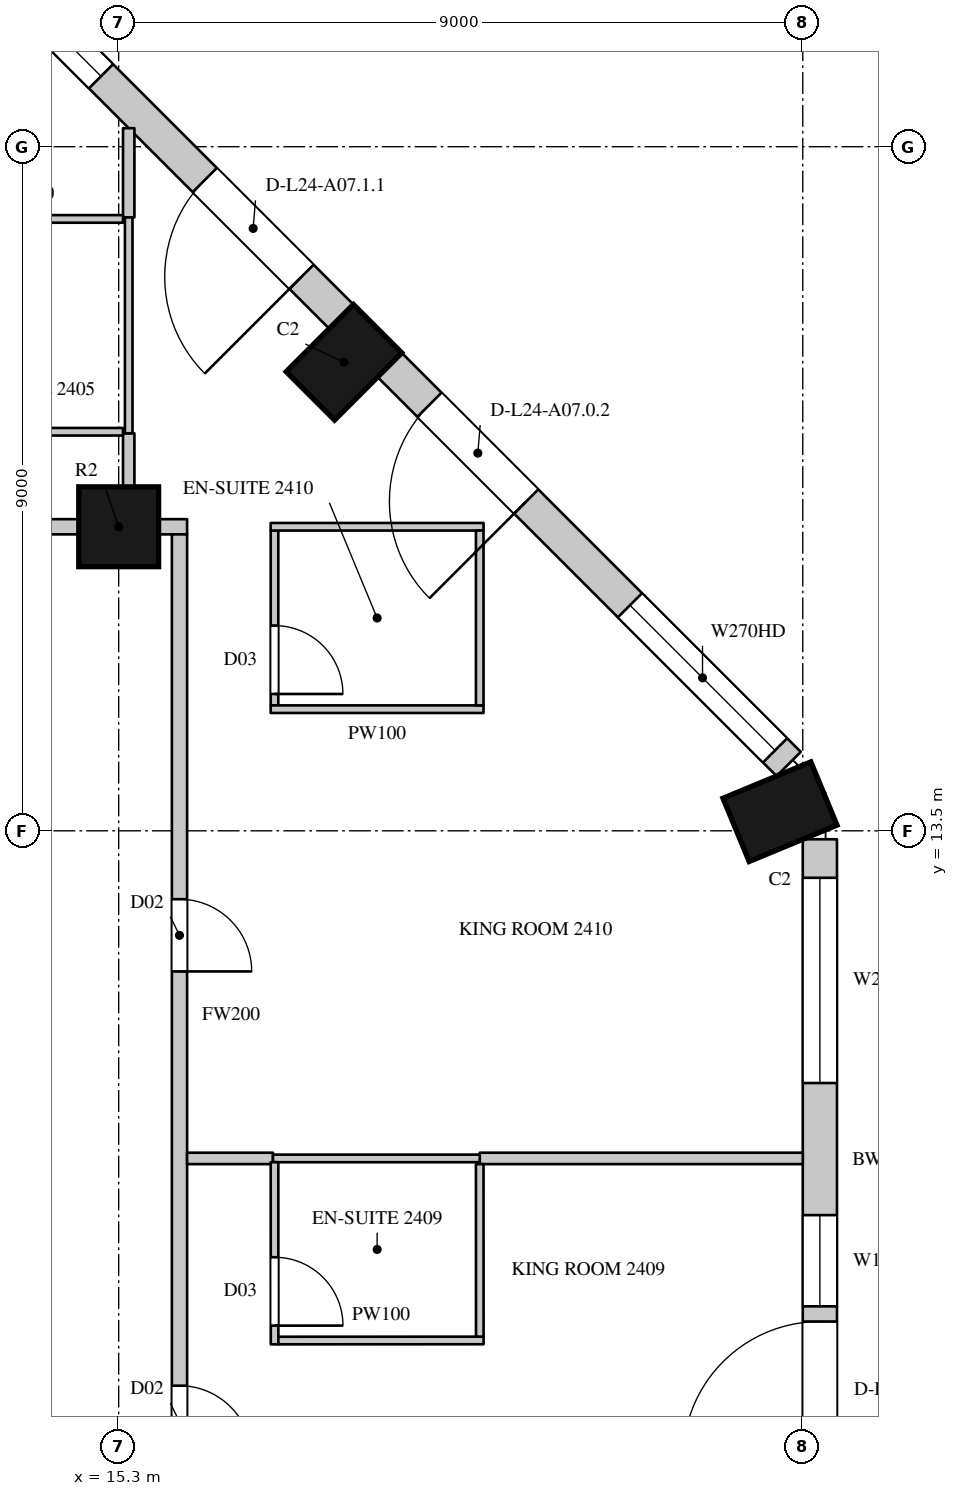
"""IFC4 building model, lengths in metres.
Left out: names, types, materials, properties, quantities, classifications, styles, units other than length and angle.
Written with IfcOpenShell. Run it as: python <this file> out.ifc"""

import sys

from ifc_helpers import new_model, si_unit, direction, frame, frame_2d, origin, origin_2d, place, context, subcontext, project, spatial, rectangle, circle, extrude, element, fill, save


model = new_model("IFC4")
c1 = context("Model", 3, precision=1e-05, world=origin(), true_north=direction((0.0, 1.0)))
c2 = subcontext(c1, "Body", "Model", "MODEL_VIEW")
j1 = project(units=[si_unit("LENGTHUNIT", "METRE"), si_unit("PLANEANGLEUNIT", "RADIAN")], contexts=[c1])
p1 = place(None, origin())
s1 = spatial("IfcSite", under=j1, at=p1, CompositionType="ELEMENT")
p2 = place(p1, origin())
s2 = spatial("IfcBuilding", under=s1, at=p2, CompositionType="ELEMENT")
p3 = place(p2, frame((0.0, 0.0, 116.7)))
s3 = spatial("IfcBuildingStorey", under=s2, at=p3, CompositionType="ELEMENT", Elevation=116.7)
for number, where, z_axis, x_axis in (
    (1, (24.0, 13.752, 0.0), (0.0, 0.0, 1.0), (-0.383, 0.924, 0.0)),
    (2, (18.264, 19.664, 0.0), (0.0, 0.0, 1.0), (-0.707, 0.707, 0.0)),
):
    element("IfcColumn", number, at=place(p3, frame(where, z_axis=z_axis, x_axis=x_axis)), inside=s3, PredefinedType="COLUMN", context=c2, shape_type="SweptSolid", body=[
        extrude(rectangle(XDim=0.9, YDim=1.25, at=origin_2d()), origin(), (0.0, 0.0, 1.0), 3.6),
    ])
p4 = place(p3, frame((15.3, 17.5, 0.0), z_axis=(0.0, 0.0, 1.0), x_axis=(1.0, 0.0, 0.0)))
e3 = element("IfcColumn", 3, at=p4, inside=s3, PredefinedType="COLUMN", context=c2, shape_type="SweptSolid", body=[
    extrude(circle(Radius=0.525, at=origin_2d()), origin(), (0.0, 0.0, 1.0), 3.6),
])
p5 = place(p3, frame((24.525, 4.95, 0.0), z_axis=(0.0, 0.0, 1.0), x_axis=(0.0, 1.0, 0.0)))
e4 = element("IfcWall", 4, at=p5, inside=s3, PredefinedType="SOLIDWALL", context=c2, shape_type="SweptSolid", body=[
    extrude(rectangle(XDim=8.439, YDim=0.45, at=frame_2d((4.219, 0.0))), origin(), (0.0, 0.0, 1.0), 3.3),
])
p6 = place(p5, frame((0.294, 0.0, 0.0)))
e5 = element("IfcOpeningElement", 5, at=p6, cuts=e4, PredefinedType="OPENING", context=c2, shape_type="SweptSolid", body=[
    extrude(rectangle(XDim=1.8, YDim=2.4, at=frame_2d((0.9, 1.2))), frame((0.0, 0.235, 0.0), z_axis=(0.0, -1.0, 0.0), x_axis=(1.0, 0.0, 0.0)), (0.0, 0.0, 1.0), 0.47),
])
p7 = place(p5, frame((2.294, 0.0, 1.05)))
e6 = element("IfcOpeningElement", 6, at=p7, cuts=e4, PredefinedType="OPENING", context=c2, shape_type="SweptSolid", body=[
    extrude(rectangle(XDim=1.2, YDim=2.0, at=frame_2d((0.6, 1.0))), frame((0.0, 0.235, 0.0), z_axis=(0.0, -1.0, 0.0), x_axis=(1.0, 0.0, 0.0)), (0.0, 0.0, 1.0), 0.47),
])
p8 = place(p5, frame((5.232, 0.0, 1.05)))
e7 = element("IfcOpeningElement", 7, at=p8, cuts=e4, PredefinedType="OPENING", context=c2, shape_type="SweptSolid", body=[
    extrude(rectangle(XDim=2.7, YDim=2.0, at=frame_2d((1.35, 1.0))), frame((0.0, 0.235, 0.0), z_axis=(0.0, -1.0, 0.0), x_axis=(1.0, 0.0, 0.0)), (0.0, 0.0, 1.0), 0.47),
])
p9 = place(p3, frame((24.115, 14.379, 0.0), z_axis=(0.0, 0.0, 1.0), x_axis=(-0.707106781187, 0.707106781187, 0.0)))
e8 = element("IfcWall", 8, at=p9, inside=s3, PredefinedType="SOLIDWALL", context=c2, shape_type="SweptSolid", body=[
    extrude(rectangle(XDim=7.424, YDim=0.45, at=frame_2d((3.712, 0.0))), origin(), (0.0, 0.0, 1.0), 3.3),
])
p10 = place(p9, frame((0.253, 0.0, 1.05)))
e9 = element("IfcOpeningElement", 9, at=p10, cuts=e8, PredefinedType="OPENING", context=c2, shape_type="SweptSolid", body=[
    extrude(rectangle(XDim=2.7, YDim=2.0, at=frame_2d((1.35, 1.0))), frame((0.0, 0.235, 0.0), z_axis=(0.0, -1.0, 0.0), x_axis=(1.0, 0.0, 0.0)), (0.0, 0.0, 1.0), 0.47),
])
p11 = place(p9, frame((4.884, 0.0, 0.0)))
e10 = element("IfcOpeningElement", 10, at=p11, cuts=e8, PredefinedType="OPENING", context=c2, shape_type="SweptSolid", body=[
    extrude(rectangle(XDim=1.8, YDim=2.4, at=frame_2d((0.9, 1.2))), frame((0.0, 0.235, 0.0), z_axis=(0.0, -1.0, 0.0), x_axis=(1.0, 0.0, 0.0)), (0.0, 0.0, 1.0), 0.47),
])
p12 = place(p3, frame((18.229, 20.265, 0.0), z_axis=(0.0, 0.0, 1.0), x_axis=(-0.707106781187, 0.707106781187, 0.0)))
e11 = element("IfcWall", 11, at=p12, inside=s3, PredefinedType="SOLIDWALL", context=c2, shape_type="SweptSolid", body=[
    extrude(rectangle(XDim=7.424, YDim=0.45, at=frame_2d((3.712, 0.0))), origin(), (0.0, 0.0, 1.0), 3.3),
])
p13 = place(p12, frame((0.74, 0.0, 0.0)))
e12 = element("IfcOpeningElement", 12, at=p13, cuts=e11, PredefinedType="OPENING", context=c2, shape_type="SweptSolid", body=[
    extrude(rectangle(XDim=1.8, YDim=2.4, at=frame_2d((0.9, 1.2))), frame((0.0, 0.235, 0.0), z_axis=(0.0, -1.0, 0.0), x_axis=(1.0, 0.0, 0.0)), (0.0, 0.0, 1.0), 0.47),
])
p14 = place(p12, frame((4.471, 0.0, 1.05)))
e13 = element("IfcOpeningElement", 13, at=p14, cuts=e11, PredefinedType="OPENING", context=c2, shape_type="SweptSolid", body=[
    extrude(rectangle(XDim=2.7, YDim=2.0, at=frame_2d((1.35, 1.0))), frame((0.0, 0.235, 0.0), z_axis=(0.0, -1.0, 0.0), x_axis=(1.0, 0.0, 0.0)), (0.0, 0.0, 1.0), 0.47),
])
p15 = place(p3, frame((23.15, 16.864, 0.0), z_axis=(0.0, 0.0, 1.0), x_axis=(-0.707106781187, 0.707106781187, 0.0)))
e14 = element("IfcWall", 14, at=p15, inside=s3, PredefinedType="SOLIDWALL", context=c2, shape_type="SweptSolid", body=[
    extrude(rectangle(XDim=1.445, YDim=0.45, at=frame_2d((0.722, 0.0))), origin(), (0.0, 0.0, 1.0), 0.6),
])
p16 = place(p3, frame((19.937, 20.078, 0.0), z_axis=(0.0, 0.0, 1.0), x_axis=(-0.707106781187, 0.707106781187, 0.0)))
e15 = element("IfcWall", 15, at=p16, inside=s3, PredefinedType="SOLIDWALL", context=c2, shape_type="SweptSolid", body=[
    extrude(rectangle(XDim=1.781, YDim=0.45, at=frame_2d((0.89, 0.0))), origin(), (0.0, 0.0, 1.0), 0.6),
])
p17 = place(p3, frame((16.486, 23.529, 0.0), z_axis=(0.0, 0.0, 1.0), x_axis=(-0.707022305137, 0.707191247145, 0.0)))
e16 = element("IfcWall", 16, at=p17, inside=s3, PredefinedType="SOLIDWALL", context=c2, shape_type="SweptSolid", body=[
    extrude(rectangle(XDim=1.445, YDim=0.45, at=frame_2d((0.723, 0.0))), origin(), (0.0, 0.0, 1.0), 0.6),
])
p18 = place(p3, frame((6.825, 17.5, 0.0), z_axis=(0.0, 0.0, 1.0), x_axis=(1.0, 0.0, 0.0)))
e17 = element("IfcWall", 17, at=p18, inside=s3, PredefinedType="PARTITIONING", context=c2, shape_type="SweptSolid", body=[
    extrude(rectangle(XDim=7.95, YDim=0.2, at=frame_2d((3.975, 0.0))), origin(), (0.0, 0.0, 1.0), 2.75),
])
p19 = place(p18, frame((1.55, 0.0, 0.0)))
e18 = element("IfcOpeningElement", 18, at=p19, cuts=e17, PredefinedType="OPENING", context=c2, shape_type="SweptSolid", body=[
    extrude(rectangle(XDim=1.1, YDim=2.4, at=frame_2d((0.55, 1.2))), frame((0.0, 0.11, 0.0), z_axis=(0.0, -1.0, 0.0), x_axis=(1.0, 0.0, 0.0)), (0.0, 0.0, 1.0), 0.22),
])
p20 = place(p3, frame((15.825, 17.5, 0.0), z_axis=(0.0, 0.0, 1.0), x_axis=(1.0, 0.0, 0.0)))
e19 = element("IfcWall", 19, at=p20, inside=s3, PredefinedType="PARTITIONING", context=c2, shape_type="SweptSolid", body=[
    extrude(rectangle(XDim=0.375, YDim=0.2, at=frame_2d((0.188, 0.0))), origin(), (0.0, 0.0, 1.0), 3.3),
])
p21 = place(p3, frame((16.1, 4.75, 0.0), z_axis=(0.0, 0.0, 1.0), x_axis=(0.0, 1.0, 0.0)))
e20 = element("IfcWall", 20, at=p21, inside=s3, PredefinedType="PARTITIONING", context=c2, shape_type="SweptSolid", body=[
    extrude(rectangle(XDim=12.65, YDim=0.2, at=frame_2d((6.325, 0.0))), origin(), (0.0, 0.0, 1.0), 3.3),
])
p22 = place(p21, frame((0.5, 0.0, 0.0)))
e21 = element("IfcOpeningElement", 21, at=p22, cuts=e20, PredefinedType="OPENING", context=c2, shape_type="SweptSolid", body=[
    extrude(rectangle(XDim=0.95, YDim=2.2, at=frame_2d((0.475, 1.1))), frame((0.0, 0.11, 0.0), z_axis=(0.0, -1.0, 0.0), x_axis=(1.0, 0.0, 0.0)), (0.0, 0.0, 1.0), 0.22),
])
p23 = place(p21, frame((6.9, 0.0, 0.0)))
e22 = element("IfcOpeningElement", 22, at=p23, cuts=e20, PredefinedType="OPENING", context=c2, shape_type="SweptSolid", body=[
    extrude(rectangle(XDim=0.95, YDim=2.2, at=frame_2d((0.475, 1.1))), frame((0.0, 0.11, 0.0), z_axis=(0.0, -1.0, 0.0), x_axis=(1.0, 0.0, 0.0)), (0.0, 0.0, 1.0), 0.22),
])
p24 = place(p3, frame((15.432, 18.016, 0.0), z_axis=(0.0, 0.0, 1.0), x_axis=(0.0, 1.0, 0.0)))
e23 = element("IfcWall", 23, at=p24, inside=s3, PredefinedType="PARTITIONING", context=c2, shape_type="SweptSolid", body=[
    extrude(rectangle(XDim=0.714, YDim=0.15, at=frame_2d((0.357, 0.0))), origin(), (0.0, 0.0, 1.0), 3.3),
])
p25 = place(p3, frame((15.432, 21.57, 0.0), z_axis=(0.0, 0.0, 1.0), x_axis=(0.0, 1.0, 0.0)))
e24 = element("IfcWall", 24, at=p25, inside=s3, PredefinedType="PARTITIONING", context=c2, shape_type="SweptSolid", body=[
    extrude(rectangle(XDim=1.174, YDim=0.15, at=frame_2d((0.587, 0.0))), origin(), (0.0, 0.0, 1.0), 3.3),
])
p26 = place(p3, frame((16.2, 9.19, 0.0), z_axis=(0.0, 0.0, 1.0), x_axis=(1.0, 0.0, 0.0)))
e25 = element("IfcWall", 25, at=p26, inside=s3, PredefinedType="PARTITIONING", context=c2, shape_type="SweptSolid", body=[
    extrude(rectangle(XDim=1.13, YDim=0.15, at=frame_2d((0.565, 0.0))), origin(), (0.0, 0.0, 1.0), 2.65),
])
p27 = place(p3, frame((20.05, 9.19, 0.0), z_axis=(0.0, 0.0, 1.0), x_axis=(1.0, 0.0, 0.0)))
e26 = element("IfcWall", 26, at=p27, inside=s3, PredefinedType="PARTITIONING", context=c2, shape_type="SweptSolid", body=[
    extrude(rectangle(XDim=4.25, YDim=0.15, at=frame_2d((2.125, 0.0))), origin(), (0.0, 0.0, 1.0), 2.65),
])
for number, where, z_axis, x_axis in (
    (27, (12.786, 18.75, 0.0), (0.0, 0.0, 1.0), (1.0, 0.0, 0.0)),
    (28, (12.786, 21.55, 0.0), (0.0, 0.0, 1.0), (1.0, 0.0, 0.0)),
):
    element("IfcWall", number, at=place(p3, frame(where, z_axis=z_axis, x_axis=x_axis)), inside=s3, PredefinedType="PARTITIONING", context=c2, shape_type="SweptSolid", body=[
        extrude(rectangle(XDim=2.571, YDim=0.1, at=frame_2d((1.286, 0.0))), origin(), (0.0, 0.0, 1.0), 3.3),
    ])
p28 = place(p3, frame((15.432, 18.73, 0.0), z_axis=(0.0, 0.0, 1.0), x_axis=(0.0, 1.0, 0.0)))
e29 = element("IfcWall", 29, at=p28, inside=s3, PredefinedType="PARTITIONING", context=c2, shape_type="SweptSolid", body=[
    extrude(rectangle(XDim=2.84, YDim=0.1, at=frame_2d((1.42, 0.0))), origin(), (0.0, 0.0, 1.0), 3.3),
])
p29 = place(p3, frame((17.33, 9.19, 0.0), z_axis=(0.0, 0.0, 1.0), x_axis=(1.0, 0.0, 0.0)))
e30 = element("IfcWall", 30, at=p29, inside=s3, PredefinedType="PARTITIONING", context=c2, shape_type="SweptSolid", body=[
    extrude(rectangle(XDim=2.72, YDim=0.1, at=frame_2d((1.36, 0.0))), origin(), (0.0, 0.0, 1.0), 2.65),
])
p30 = place(p3, frame((17.35, 9.14, 0.0), z_axis=(0.0, 0.0, 1.0), x_axis=(0.000407580973, -0.999999916939, 0.0)))
e31 = element("IfcWall", 31, at=p30, inside=s3, PredefinedType="PARTITIONING", context=c2, shape_type="SweptSolid", body=[
    extrude(rectangle(XDim=2.396, YDim=0.1, at=frame_2d((1.198, 0.0))), origin(), (0.0, 0.0, 1.0), 3.3),
])
p31 = place(p30, frame((1.25, 0.0, 0.0)))
e32 = element("IfcOpeningElement", 32, at=p31, cuts=e31, PredefinedType="OPENING", context=c2, shape_type="SweptSolid", body=[
    extrude(rectangle(XDim=0.9, YDim=2.2, at=frame_2d((0.45, 1.1))), frame((0.0, 0.06, 0.0), z_axis=(0.0, -1.0, 0.0), x_axis=(1.0, 0.0, 0.0)), (0.0, 0.0, 1.0), 0.12),
])
p32 = place(p3, frame((17.35, 15.15, 0.0), z_axis=(0.0, 0.0, 1.0), x_axis=(0.0, 1.0, 0.0)))
e33 = element("IfcWall", 33, at=p32, inside=s3, PredefinedType="PARTITIONING", context=c2, shape_type="SweptSolid", body=[
    extrude(rectangle(XDim=2.3, YDim=0.1, at=frame_2d((1.15, 0.0))), origin(), (0.0, 0.0, 1.0), 3.3),
])
p33 = place(p32, frame((0.15, 0.0, 0.0)))
e34 = element("IfcOpeningElement", 34, at=p33, cuts=e33, PredefinedType="OPENING", context=c2, shape_type="SweptSolid", body=[
    extrude(rectangle(XDim=0.9, YDim=2.2, at=frame_2d((0.45, 1.1))), frame((0.0, 0.06, 0.0), z_axis=(0.0, -1.0, 0.0), x_axis=(1.0, 0.0, 0.0)), (0.0, 0.0, 1.0), 0.12),
])
for number, where, z_axis, x_axis in (
    (35, (17.3, 15.1, 0.0), (0.0, 0.0, 1.0), (1.0, 0.0, 0.0)),
    (36, (17.3, 17.5, 0.0), (0.0, 0.0, 1.0), (1.0, 0.0, 0.0)),
):
    element("IfcWall", number, at=place(p3, frame(where, z_axis=z_axis, x_axis=x_axis)), inside=s3, PredefinedType="PARTITIONING", context=c2, shape_type="SweptSolid", body=[
        extrude(rectangle(XDim=2.8, YDim=0.1, at=frame_2d((1.4, 0.0))), origin(), (0.0, 0.0, 1.0), 3.3),
    ])
p34 = place(p3, frame((17.401, 6.794, 0.0), z_axis=(0.0, 0.0, 1.0), x_axis=(0.9999999346, 0.000361663629, 0.0)))
e37 = element("IfcWall", 37, at=p34, inside=s3, PredefinedType="PARTITIONING", context=c2, shape_type="SweptSolid", body=[
    extrude(rectangle(XDim=2.7, YDim=0.1, at=frame_2d((1.35, 0.0))), origin(), (0.0, 0.0, 1.0), 3.3),
])
p35 = place(p3, frame((20.05, 9.115, 0.0), z_axis=(0.0, 0.0, 1.0), x_axis=(0.000430200003, -0.999999907464, 0.0)))
e38 = element("IfcWall", 38, at=p35, inside=s3, PredefinedType="PARTITIONING", context=c2, shape_type="SweptSolid", body=[
    extrude(rectangle(XDim=2.27, YDim=0.1, at=frame_2d((1.135, 0.0))), origin(), (0.0, 0.0, 1.0), 3.3),
])
p36 = place(p3, frame((20.05, 15.15, 0.0), z_axis=(0.0, 0.0, 1.0), x_axis=(0.0, 1.0, 0.0)))
e39 = element("IfcWall", 39, at=p36, inside=s3, PredefinedType="PARTITIONING", context=c2, shape_type="SweptSolid", body=[
    extrude(rectangle(XDim=2.3, YDim=0.1, at=frame_2d((1.15, 0.0))), origin(), (0.0, 0.0, 1.0), 3.3),
])
p37 = place(p6, origin())
e40 = element("IfcDoor", 40, at=p37, inside=s3, OperationType="SLIDING_TO_LEFT", PredefinedType="DOOR", context=c2, shape_type="SweptSolid", body=[
    extrude(rectangle(XDim=1.8, YDim=2.4, at=frame_2d((0.9, 1.2))), frame((0.0, 0.13, 0.0), z_axis=(0.0, -1.0, 0.0), x_axis=(1.0, 0.0, 0.0)), (0.0, 0.0, 1.0), 0.05),
])
fill(e5, e40)
p38 = place(p7, origin())
e41 = element("IfcWindow", 41, at=p38, inside=s3, PartitioningType="SINGLE_PANEL", PredefinedType="WINDOW", context=c2, shape_type="SweptSolid", body=[
    extrude(rectangle(XDim=1.2, YDim=2.0, at=frame_2d((0.6, 1.0))), frame((0.0, 0.135, 0.0), z_axis=(0.0, -1.0, 0.0), x_axis=(1.0, 0.0, 0.0)), (0.0, 0.0, 1.0), 0.06),
])
fill(e6, e41)
p39 = place(p8, origin())
e42 = element("IfcWindow", 42, at=p39, inside=s3, PartitioningType="SINGLE_PANEL", PredefinedType="WINDOW", context=c2, shape_type="SweptSolid", body=[
    extrude(rectangle(XDim=2.7, YDim=2.0, at=frame_2d((1.35, 1.0))), frame((0.0, 0.135, 0.0), z_axis=(0.0, -1.0, 0.0), x_axis=(1.0, 0.0, 0.0)), (0.0, 0.0, 1.0), 0.06),
])
fill(e7, e42)
p40 = place(p10, origin())
e43 = element("IfcWindow", 43, at=p40, inside=s3, PartitioningType="SINGLE_PANEL", PredefinedType="WINDOW", context=c2, shape_type="SweptSolid", body=[
    extrude(rectangle(XDim=2.7, YDim=2.0, at=frame_2d((1.35, 1.0))), frame((0.0, 0.135, 0.0), z_axis=(0.0, -1.0, 0.0), x_axis=(1.0, 0.0, 0.0)), (0.0, 0.0, 1.0), 0.06),
])
fill(e9, e43)
p41 = place(p11, origin())
e44 = element("IfcDoor", 44, at=p41, inside=s3, OperationType="SLIDING_TO_LEFT", PredefinedType="DOOR", context=c2, shape_type="SweptSolid", body=[
    extrude(rectangle(XDim=1.8, YDim=2.4, at=frame_2d((0.9, 1.2))), frame((0.0, 0.13, 0.0), z_axis=(0.0, -1.0, 0.0), x_axis=(1.0, 0.0, 0.0)), (0.0, 0.0, 1.0), 0.05),
])
fill(e10, e44)
p42 = place(p13, origin())
e45 = element("IfcDoor", 45, at=p42, inside=s3, OperationType="SLIDING_TO_LEFT", PredefinedType="DOOR", context=c2, shape_type="SweptSolid", body=[
    extrude(rectangle(XDim=1.8, YDim=2.4, at=frame_2d((0.9, 1.2))), frame((0.0, 0.13, 0.0), z_axis=(0.0, -1.0, 0.0), x_axis=(1.0, 0.0, 0.0)), (0.0, 0.0, 1.0), 0.05),
])
fill(e12, e45)
p43 = place(p14, origin())
e46 = element("IfcWindow", 46, at=p43, inside=s3, PartitioningType="SINGLE_PANEL", PredefinedType="WINDOW", context=c2, shape_type="SweptSolid", body=[
    extrude(rectangle(XDim=2.7, YDim=2.0, at=frame_2d((1.35, 1.0))), frame((0.0, 0.135, 0.0), z_axis=(0.0, -1.0, 0.0), x_axis=(1.0, 0.0, 0.0)), (0.0, 0.0, 1.0), 0.06),
])
fill(e13, e46)
p44 = place(p22, origin())
e47 = element("IfcDoor", 47, at=p44, inside=s3, OperationType="SINGLE_SWING_RIGHT", PredefinedType="DOOR", context=c2, shape_type="SweptSolid", body=[
    extrude(rectangle(XDim=0.95, YDim=2.2, at=frame_2d((0.475, 1.1))), frame((0.0, 0.025, 0.0), z_axis=(0.0, -1.0, 0.0), x_axis=(1.0, 0.0, 0.0)), (0.0, 0.0, 1.0), 0.05),
])
fill(e21, e47)
p45 = place(p31, origin())
e48 = element("IfcDoor", 48, at=p45, inside=s3, OperationType="SINGLE_SWING_RIGHT", PredefinedType="DOOR", context=c2, shape_type="SweptSolid", body=[
    extrude(rectangle(XDim=0.9, YDim=2.2, at=frame_2d((0.45, 1.1))), frame((0.0, 0.025, 0.0), z_axis=(0.0, -1.0, 0.0), x_axis=(1.0, 0.0, 0.0)), (0.0, 0.0, 1.0), 0.05),
])
fill(e32, e48)
p46 = place(p23, origin())
e49 = element("IfcDoor", 49, at=p46, inside=s3, OperationType="SINGLE_SWING_RIGHT", PredefinedType="DOOR", context=c2, shape_type="SweptSolid", body=[
    extrude(rectangle(XDim=0.95, YDim=2.2, at=frame_2d((0.475, 1.1))), frame((0.0, 0.025, 0.0), z_axis=(0.0, -1.0, 0.0), x_axis=(1.0, 0.0, 0.0)), (0.0, 0.0, 1.0), 0.05),
])
fill(e22, e49)
p47 = place(p33, origin())
e50 = element("IfcDoor", 50, at=p47, inside=s3, OperationType="SINGLE_SWING_RIGHT", PredefinedType="DOOR", context=c2, shape_type="SweptSolid", body=[
    extrude(rectangle(XDim=0.9, YDim=2.2, at=frame_2d((0.45, 1.1))), frame((0.0, 0.025, 0.0), z_axis=(0.0, -1.0, 0.0), x_axis=(1.0, 0.0, 0.0)), (0.0, 0.0, 1.0), 0.05),
])
fill(e34, e50)
save(model, sys.argv[1])
